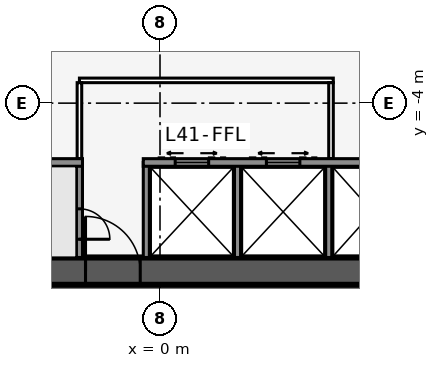
"""IFC4 building model, lengths in metres.
Left out: names, types, materials, properties, quantities, classifications, styles, units other than length and angle.
Written with IfcOpenShell. Run it as: python <this file> out.ifc"""

import sys

from ifc_helpers import new_model, si_unit, direction, frame, frame_2d, origin, place, context, subcontext, project, spatial, rectangle, extrude, element, fill, save


model = new_model("IFC4")
c1 = context("Model", 3, precision=1e-05, world=origin(), true_north=direction((0.0, 1.0)))
c2 = subcontext(c1, "Body", "Model", "MODEL_VIEW")
j1 = project(units=[si_unit("LENGTHUNIT", "METRE"), si_unit("PLANEANGLEUNIT", "RADIAN")], contexts=[c1])
p1 = place(None, origin())
s1 = spatial("IfcSite", under=j1, at=p1, CompositionType="ELEMENT")
p2 = place(p1, origin())
s2 = spatial("IfcBuilding", under=s1, at=p2, CompositionType="ELEMENT")
p3 = place(p2, frame((0.0, 0.0, 155.5)))
s3 = spatial("IfcBuildingStorey", under=s2, at=p3, CompositionType="ELEMENT", Elevation=155.5)
p4 = place(p3, frame((-16.5, -9.526, 0.0), z_axis=(0.0, 0.0, 1.0), x_axis=(1.0, 0.0, 0.0)))
e1 = element("IfcWall", 1, at=p4, inside=s3, PredefinedType="SHEAR", context=c2, shape_type="SweptSolid", body=[
    extrude(rectangle(XDim=33.0, YDim=0.9, at=frame_2d((16.5, 0.0))), origin(), (0.0, 0.0, 1.0), 3.4),
])
p5 = place(p4, frame((14.05, 0.0, 0.0)))
e2 = element("IfcOpeningElement", 2, at=p5, cuts=e1, PredefinedType="OPENING", context=c2, shape_type="SweptSolid", body=[
    extrude(rectangle(XDim=1.8, YDim=2.13, at=frame_2d((0.9, 1.065))), frame((0.0, 0.46, 0.0), z_axis=(0.0, -1.0, 0.0), x_axis=(1.0, 0.0, 0.0)), (0.0, 0.0, 1.0), 0.92),
])
p6 = place(p3, frame((-10.183, -5.951, 0.0), z_axis=(0.0, 0.0, 1.0), x_axis=(1.0, 0.0, 0.0)))
e3 = element("IfcWall", 3, at=p6, inside=s3, PredefinedType="SOLIDWALL", context=c2, shape_type="SweptSolid", body=[
    extrude(rectangle(XDim=7.633, YDim=0.25, at=frame_2d((3.816, 0.0))), origin(), (0.0, 0.0, 1.0), 3.235),
])
p7 = place(p3, frame((-0.55, -5.951, 0.0), z_axis=(0.0, 0.0, 1.0), x_axis=(1.0, 0.0, 0.0)))
e4 = element("IfcWall", 4, at=p7, inside=s3, PredefinedType="SOLIDWALL", context=c2, shape_type="SweptSolid", body=[
    extrude(rectangle(XDim=10.733, YDim=0.25, at=frame_2d((5.366, 0.0))), origin(), (0.0, 0.0, 1.0), 3.235),
])
p8 = place(p7, frame((9.314, 0.0, 0.0)))
e5 = element("IfcOpeningElement", 5, at=p8, cuts=e4, PredefinedType="OPENING", context=c2, shape_type="SweptSolid", body=[
    extrude(rectangle(XDim=0.9, YDim=2.13, at=frame_2d((0.45, 1.065))), frame((0.0, 0.135, 0.0), z_axis=(0.0, -1.0, 0.0), x_axis=(1.0, 0.0, 0.0)), (0.0, 0.0, 1.0), 0.27),
])
p9 = place(p7, frame((1.05, 0.0, 0.0)))
e6 = element("IfcOpeningElement", 6, at=p9, cuts=e4, PredefinedType="OPENING", context=c2, shape_type="SweptSolid", body=[
    extrude(rectangle(XDim=1.1, YDim=2.13, at=frame_2d((0.55, 1.065))), frame((0.0, 0.135, 0.0), z_axis=(0.0, -1.0, 0.0), x_axis=(1.0, 0.0, 0.0)), (0.0, 0.0, 1.0), 0.27),
])
p10 = place(p7, frame((4.05, 0.0, 0.0)))
e7 = element("IfcOpeningElement", 7, at=p10, cuts=e4, PredefinedType="OPENING", context=c2, shape_type="SweptSolid", body=[
    extrude(rectangle(XDim=1.1, YDim=2.13, at=frame_2d((0.55, 1.065))), frame((0.0, 0.135, 0.0), z_axis=(0.0, -1.0, 0.0), x_axis=(1.0, 0.0, 0.0)), (0.0, 0.0, 1.0), 0.27),
])
p11 = place(p3, frame((-2.65, -5.951, 0.0), z_axis=(0.0, 0.0, 1.0), x_axis=(0.0, -1.0, 0.0)))
e8 = element("IfcWall", 8, at=p11, inside=s3, PredefinedType="SOLIDWALL", context=c2, shape_type="SweptSolid", body=[
    extrude(rectangle(XDim=3.125, YDim=0.2, at=frame_2d((1.562, 0.0))), origin(), (0.0, 0.0, 1.0), 3.235),
])
p12 = place(p11, frame((1.525, 0.0, 0.0)))
e9 = element("IfcOpeningElement", 9, at=p12, cuts=e8, PredefinedType="OPENING", context=c2, shape_type="SweptSolid", body=[
    extrude(rectangle(XDim=1.0, YDim=2.13, at=frame_2d((0.5, 1.065))), frame((0.0, 0.11, 0.0), z_axis=(0.0, -1.0, 0.0), x_axis=(1.0, 0.0, 0.0)), (0.0, 0.0, 1.0), 0.22),
])
for number, where, z_axis, x_axis in (
    (10, (-0.45, -5.951, 0.0), (0.0, 0.0, 1.0), (0.0, -1.0, 0.0)),
    (11, (2.55, -5.951, 0.0), (0.0, 0.0, 1.0), (0.0, -1.0, 0.0)),
    (12, (5.55, -5.951, 0.0), (0.0, 0.0, 1.0), (0.0, -1.0, 0.0)),
):
    element("IfcWall", number, at=place(p3, frame(where, z_axis=z_axis, x_axis=x_axis)), inside=s3, PredefinedType="SOLIDWALL", context=c2, shape_type="SweptSolid", body=[
        extrude(rectangle(XDim=3.125, YDim=0.2, at=frame_2d((1.562, 0.0))), origin(), (0.0, 0.0, 1.0), 3.235),
    ])
p13 = place(p3, frame((16.5, -9.526, 0.0), z_axis=(0.0, 0.0, 1.0), x_axis=(-0.499999749417, 0.866025548458, 0.0)))
e13 = element("IfcWall", 13, at=p13, inside=s3, PredefinedType="SHEAR", context=c2, shape_type="SweptSolid", body=[
    extrude(rectangle(XDim=33.0, YDim=0.9, at=frame_2d((16.5, 0.0))), origin(), (0.0, 0.0, 1.0), 3.4),
])
p14 = place(p13, frame((14.15, 0.0, 0.0)))
e14 = element("IfcOpeningElement", 14, at=p14, cuts=e13, PredefinedType="OPENING", context=c2, shape_type="SweptSolid", body=[
    extrude(rectangle(XDim=1.8, YDim=2.13, at=frame_2d((0.9, 1.065))), frame((0.0, 0.46, 0.0), z_axis=(0.0, -1.0, 0.0), x_axis=(1.0, 0.0, 0.0)), (0.0, 0.0, 1.0), 0.92),
])
p15 = place(p13, frame((12.6, 0.0, 0.0)))
e15 = element("IfcOpeningElement", 15, at=p15, cuts=e13, PredefinedType="OPENING", context=c2, shape_type="SweptSolid", body=[
    extrude(rectangle(XDim=1.0, YDim=2.13, at=frame_2d((0.5, 1.065))), frame((0.0, 0.46, 0.0), z_axis=(0.0, -1.0, 0.0), x_axis=(1.0, 0.0, 0.0)), (0.0, 0.0, 1.0), 0.92),
])
p16 = place(p3, frame((10.245, -5.843, 0.0), z_axis=(0.0, 0.0, 1.0), x_axis=(-0.499993009313, 0.866029439822, 0.0)))
e16 = element("IfcWall", 16, at=p16, inside=s3, PredefinedType="SOLIDWALL", context=c2, shape_type="SweptSolid", body=[
    extrude(rectangle(XDim=7.733, YDim=0.25, at=frame_2d((3.866, 0.0))), origin(), (0.0, 0.0, 1.0), 3.235),
])
p17 = place(p3, frame((0.0, 19.052, 0.0), z_axis=(0.0, 0.0, 1.0), x_axis=(-0.499999749417, -0.866025548458, 0.0)))
e17 = element("IfcWall", 17, at=p17, inside=s3, PredefinedType="SHEAR", context=c2, shape_type="SweptSolid", body=[
    extrude(rectangle(XDim=33.0, YDim=0.9, at=frame_2d((16.5, 0.0))), origin(), (0.0, 0.0, 1.0), 3.4),
])
p18 = place(p17, frame((14.15, 0.0, 0.0)))
e18 = element("IfcOpeningElement", 18, at=p18, cuts=e17, PredefinedType="OPENING", context=c2, shape_type="SweptSolid", body=[
    extrude(rectangle(XDim=1.8, YDim=2.13, at=frame_2d((0.9, 1.065))), frame((0.0, 0.46, 0.0), z_axis=(0.0, -1.0, 0.0), x_axis=(1.0, 0.0, 0.0)), (0.0, 0.0, 1.0), 0.92),
])
p19 = place(p17, frame((12.6, 0.0, 0.0)))
e19 = element("IfcOpeningElement", 19, at=p19, cuts=e17, PredefinedType="OPENING", context=c2, shape_type="SweptSolid", body=[
    extrude(rectangle(XDim=1.0, YDim=2.13, at=frame_2d((0.5, 1.065))), frame((0.0, 0.46, 0.0), z_axis=(0.0, -1.0, 0.0), x_axis=(1.0, 0.0, 0.0)), (0.0, 0.0, 1.0), 0.92),
])
p20 = place(p3, frame((20.027, -10.985, 0.0), z_axis=(0.0, 0.0, 1.0), x_axis=(-0.500001677587, 0.866024435227, 0.0)))
e20 = element("IfcWall", 20, at=p20, inside=s3, PredefinedType="PARTITIONING", context=c2, shape_type="SweptSolid", body=[
    extrude(rectangle(XDim=39.054, YDim=0.15, at=frame_2d((19.527, 0.0))), origin(), (0.0, 0.0, 1.0), 3.235),
])
p21 = place(p20, frame((1.558, 0.0, 0.0)))
e21 = element("IfcOpeningElement", 21, at=p21, cuts=e20, PredefinedType="OPENING", context=c2, shape_type="SweptSolid", body=[
    extrude(rectangle(XDim=0.95, YDim=2.13, at=frame_2d((0.475, 1.065))), frame((0.0, 0.085, 0.0), z_axis=(0.0, -1.0, 0.0), x_axis=(1.0, 0.0, 0.0)), (0.0, 0.0, 1.0), 0.17),
])
p22 = place(p20, frame((15.352, 0.0, 0.0)))
e22 = element("IfcOpeningElement", 22, at=p22, cuts=e20, PredefinedType="OPENING", context=c2, shape_type="SweptSolid", body=[
    extrude(rectangle(XDim=0.95, YDim=2.13, at=frame_2d((0.475, 1.065))), frame((0.0, 0.085, 0.0), z_axis=(0.0, -1.0, 0.0), x_axis=(1.0, 0.0, 0.0)), (0.0, 0.0, 1.0), 0.17),
])
p23 = place(p20, frame((22.752, 0.0, 0.0)))
e23 = element("IfcOpeningElement", 23, at=p23, cuts=e20, PredefinedType="OPENING", context=c2, shape_type="SweptSolid", body=[
    extrude(rectangle(XDim=0.95, YDim=2.13, at=frame_2d((0.475, 1.065))), frame((0.0, 0.085, 0.0), z_axis=(0.0, -1.0, 0.0), x_axis=(1.0, 0.0, 0.0)), (0.0, 0.0, 1.0), 0.17),
])
p24 = place(p20, frame((30.952, 0.0, 0.0)))
e24 = element("IfcOpeningElement", 24, at=p24, cuts=e20, PredefinedType="OPENING", context=c2, shape_type="SweptSolid", body=[
    extrude(rectangle(XDim=0.95, YDim=2.13, at=frame_2d((0.475, 1.065))), frame((0.0, 0.085, 0.0), z_axis=(0.0, -1.0, 0.0), x_axis=(1.0, 0.0, 0.0)), (0.0, 0.0, 1.0), 0.17),
])
p25 = place(p20, frame((37.752, 0.0, 0.0)))
e25 = element("IfcOpeningElement", 25, at=p25, cuts=e20, PredefinedType="OPENING", context=c2, shape_type="SweptSolid", body=[
    extrude(rectangle(XDim=0.95, YDim=2.13, at=frame_2d((0.475, 1.065))), frame((0.0, 0.085, 0.0), z_axis=(0.0, -1.0, 0.0), x_axis=(1.0, 0.0, 0.0)), (0.0, 0.0, 1.0), 0.17),
])
p26 = place(p3, frame((-0.5, 22.836, 0.0), z_axis=(0.0, 0.0, 1.0), x_axis=(-0.500001677587, -0.866024435227, 0.0)))
e26 = element("IfcWall", 26, at=p26, inside=s3, PredefinedType="PARTITIONING", context=c2, shape_type="SweptSolid", body=[
    extrude(rectangle(XDim=39.054, YDim=0.15, at=frame_2d((19.527, 0.0))), origin(), (0.0, 0.0, 1.0), 3.235),
])
p27 = place(p26, frame((0.352, 0.0, 0.0)))
e27 = element("IfcOpeningElement", 27, at=p27, cuts=e26, PredefinedType="OPENING", context=c2, shape_type="SweptSolid", body=[
    extrude(rectangle(XDim=0.95, YDim=2.13, at=frame_2d((0.475, 1.065))), frame((0.0, 0.085, 0.0), z_axis=(0.0, -1.0, 0.0), x_axis=(1.0, 0.0, 0.0)), (0.0, 0.0, 1.0), 0.17),
])
p28 = place(p26, frame((5.952, 0.0, 0.0)))
e28 = element("IfcOpeningElement", 28, at=p28, cuts=e26, PredefinedType="OPENING", context=c2, shape_type="SweptSolid", body=[
    extrude(rectangle(XDim=0.95, YDim=2.13, at=frame_2d((0.475, 1.065))), frame((0.0, 0.085, 0.0), z_axis=(0.0, -1.0, 0.0), x_axis=(1.0, 0.0, 0.0)), (0.0, 0.0, 1.0), 0.17),
])
p29 = place(p26, frame((12.752, 0.0, 0.0)))
e29 = element("IfcOpeningElement", 29, at=p29, cuts=e26, PredefinedType="OPENING", context=c2, shape_type="SweptSolid", body=[
    extrude(rectangle(XDim=0.95, YDim=2.13, at=frame_2d((0.475, 1.065))), frame((0.0, 0.085, 0.0), z_axis=(0.0, -1.0, 0.0), x_axis=(1.0, 0.0, 0.0)), (0.0, 0.0, 1.0), 0.17),
])
p30 = place(p26, frame((25.352, 0.0, 0.0)))
e30 = element("IfcOpeningElement", 30, at=p30, cuts=e26, PredefinedType="OPENING", context=c2, shape_type="SweptSolid", body=[
    extrude(rectangle(XDim=0.95, YDim=2.13, at=frame_2d((0.475, 1.065))), frame((0.0, 0.085, 0.0), z_axis=(0.0, -1.0, 0.0), x_axis=(1.0, 0.0, 0.0)), (0.0, 0.0, 1.0), 0.17),
])
p31 = place(p26, frame((32.152, 0.0, 0.0)))
e31 = element("IfcOpeningElement", 31, at=p31, cuts=e26, PredefinedType="OPENING", context=c2, shape_type="SweptSolid", body=[
    extrude(rectangle(XDim=0.95, YDim=2.13, at=frame_2d((0.475, 1.065))), frame((0.0, 0.085, 0.0), z_axis=(0.0, -1.0, 0.0), x_axis=(1.0, 0.0, 0.0)), (0.0, 0.0, 1.0), 0.17),
])
p32 = place(p26, frame((37.752, 0.0, 0.0)))
e32 = element("IfcOpeningElement", 32, at=p32, cuts=e26, PredefinedType="OPENING", context=c2, shape_type="SweptSolid", body=[
    extrude(rectangle(XDim=0.95, YDim=2.13, at=frame_2d((0.475, 1.065))), frame((0.0, 0.085, 0.0), z_axis=(0.0, -1.0, 0.0), x_axis=(1.0, 0.0, 0.0)), (0.0, 0.0, 1.0), 0.17),
])
p33 = place(p3, frame((-2.65, -3.251, 0.0), z_axis=(0.0, 0.0, 1.0), x_axis=(1.0, 0.0, 0.0)))
e33 = element("IfcWall", 33, at=p33, inside=s3, PredefinedType="PARTITIONING", context=c2, shape_type="SweptSolid", body=[
    extrude(rectangle(XDim=8.35, YDim=0.15, at=frame_2d((4.175, 0.0))), origin(), (0.0, 0.0, 1.0), 3.235),
])
for number, where, z_axis, x_axis in (
    (34, (-2.65, -5.826, 0.0), (0.0, 0.0, 1.0), (0.0, 1.0, 0.0)),
    (35, (5.625, -5.826, 0.0), (0.0, 0.0, 1.0), (0.0, 1.0, 0.0)),
):
    element("IfcWall", number, at=place(p3, frame(where, z_axis=z_axis, x_axis=x_axis)), inside=s3, PredefinedType="PARTITIONING", context=c2, shape_type="SweptSolid", body=[
        extrude(rectangle(XDim=2.5, YDim=0.15, at=frame_2d((1.25, 0.0))), origin(), (0.0, 0.0, 1.0), 3.235),
    ])
p34 = place(p5, origin())
e36 = element("IfcDoor", 36, at=p34, inside=s3, OperationType="DOUBLE_DOOR_SINGLE_SWING", PredefinedType="DOOR", context=c2, shape_type="SweptSolid", body=[
    extrude(rectangle(XDim=1.8, YDim=2.13, at=frame_2d((0.9, 1.065))), frame((0.0, 0.025, 0.0), z_axis=(0.0, -1.0, 0.0), x_axis=(1.0, 0.0, 0.0)), (0.0, 0.0, 1.0), 0.05),
])
fill(e2, e36)
p35 = place(p12, origin())
e37 = element("IfcDoor", 37, at=p35, inside=s3, OperationType="SINGLE_SWING_RIGHT", PredefinedType="DOOR", context=c2, shape_type="SweptSolid", body=[
    extrude(rectangle(XDim=1.0, YDim=2.13, at=frame_2d((0.5, 1.065))), frame((0.0, 0.025, 0.0), z_axis=(0.0, -1.0, 0.0), x_axis=(1.0, 0.0, 0.0)), (0.0, 0.0, 1.0), 0.05),
])
fill(e9, e37)
p36 = place(p9, origin())
e38 = element("IfcDoor", 38, at=p36, inside=s3, OperationType="DOUBLE_DOOR_SLIDING", PredefinedType="USERDEFINED", context=c2, shape_type="SweptSolid", body=[
    extrude(rectangle(XDim=1.1, YDim=2.13, at=frame_2d((0.55, 1.065))), frame((0.0, 0.025, 0.0), z_axis=(0.0, -1.0, 0.0), x_axis=(1.0, 0.0, 0.0)), (0.0, 0.0, 1.0), 0.05),
])
fill(e6, e38)
p37 = place(p10, origin())
e39 = element("IfcDoor", 39, at=p37, inside=s3, OperationType="DOUBLE_DOOR_SLIDING", PredefinedType="USERDEFINED", context=c2, shape_type="SweptSolid", body=[
    extrude(rectangle(XDim=1.1, YDim=2.13, at=frame_2d((0.55, 1.065))), frame((0.0, 0.025, 0.0), z_axis=(0.0, -1.0, 0.0), x_axis=(1.0, 0.0, 0.0)), (0.0, 0.0, 1.0), 0.05),
])
fill(e7, e39)
save(model, sys.argv[1])
